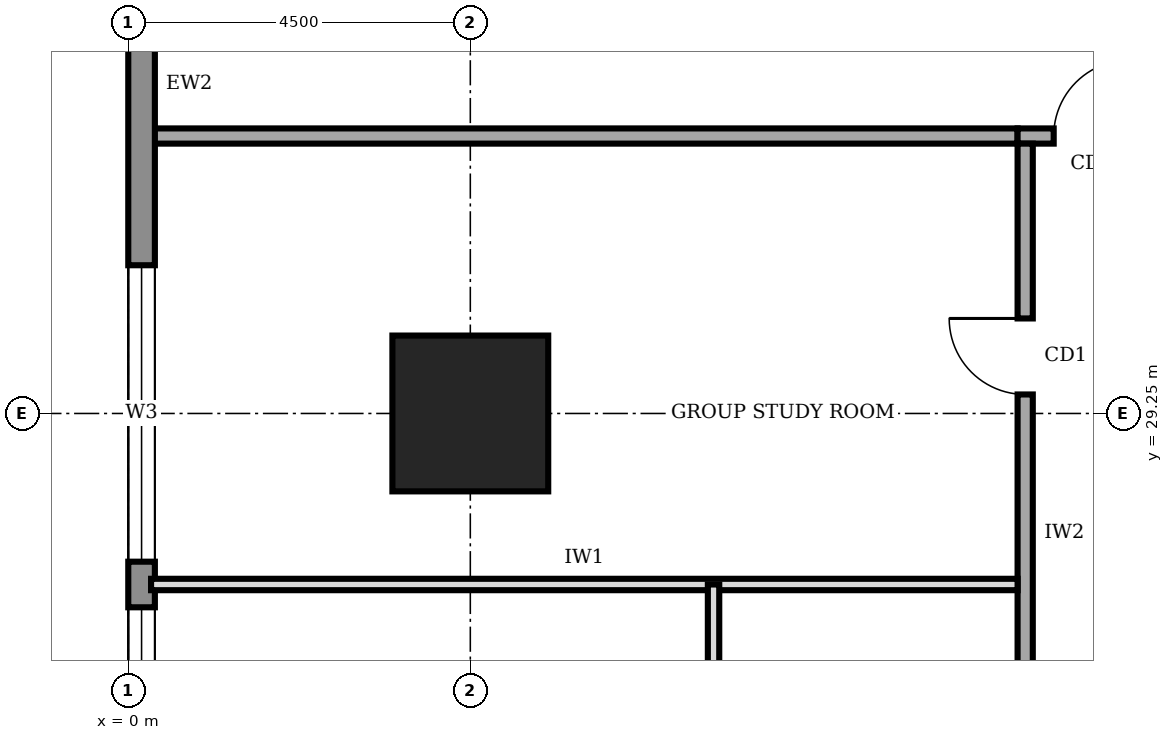
"""IFC4 building model, lengths in metres.
Left out: names, types, materials, properties, quantities, classifications, styles, units other than length and angle.
Written with IfcOpenShell. Run it as: python <this file> out.ifc"""

import sys

from ifc_helpers import new_model, si_unit, direction, frame, frame_2d, origin, origin_2d, place, context, subcontext, project, spatial, rectangle, extrude, element, fill, save


model = new_model("IFC4")
c1 = context("Model", 3, precision=1e-05, world=origin(), true_north=direction((0.0, 1.0)))
c2 = subcontext(c1, "Body", "Model", "MODEL_VIEW")
j1 = project(units=[si_unit("LENGTHUNIT", "METRE"), si_unit("PLANEANGLEUNIT", "RADIAN")], contexts=[c1])
p1 = place(None, origin())
s1 = spatial("IfcSite", under=j1, at=p1, CompositionType="ELEMENT")
p2 = place(p1, origin())
s2 = spatial("IfcBuilding", under=s1, at=p2, CompositionType="ELEMENT")
p3 = place(p2, frame((0.0, 0.0, 193.0)))
s3 = spatial("IfcBuildingStorey", under=s2, at=p3, CompositionType="ELEMENT", Elevation=193.0)
p4 = place(p3, frame((4.5, 29.25, 0.0), z_axis=(0.0, 0.0, 1.0), x_axis=(1.0, 0.0, 0.0)))
e1 = element("IfcColumn", 1, at=p4, inside=s3, PredefinedType="COLUMN", context=c2, shape_type="SweptSolid", body=[
    extrude(rectangle(XDim=2.05, YDim=2.05, at=origin_2d()), origin(), (0.0, 0.0, 1.0), 4.0),
])
p5 = place(p3, frame((0.175, 35.98, 0.0), z_axis=(0.0, 0.0, 1.0), x_axis=(0.0, -1.0, 0.0)))
e2 = element("IfcWall", 2, at=p5, inside=s3, PredefinedType="STANDARD", context=c2, shape_type="SweptSolid", body=[
    extrude(rectangle(XDim=31.46, YDim=0.35, at=frame_2d((15.73, 0.0))), origin(), (0.0, 0.0, 1.0), 3.75),
])
p6 = place(p5, frame((27.21, 0.0, 0.95)))
e3 = element("IfcOpeningElement", 3, at=p6, cuts=e2, PredefinedType="OPENING", context=c2, shape_type="SweptSolid", body=[
    extrude(rectangle(XDim=3.9, YDim=1.8, at=frame_2d((1.95, 0.9))), frame((0.0, 0.185, 0.0), z_axis=(0.0, -1.0, 0.0), x_axis=(1.0, 0.0, 0.0)), (0.0, 0.0, 1.0), 0.37),
])
p7 = place(p5, frame((22.78, 0.0, 0.95)))
e4 = element("IfcOpeningElement", 4, at=p7, cuts=e2, PredefinedType="OPENING", context=c2, shape_type="SweptSolid", body=[
    extrude(rectangle(XDim=3.9, YDim=1.8, at=frame_2d((1.95, 0.9))), frame((0.0, 0.185, 0.0), z_axis=(0.0, -1.0, 0.0), x_axis=(1.0, 0.0, 0.0)), (0.0, 0.0, 1.0), 0.37),
])
p8 = place(p5, frame((18.28, 0.0, 0.95)))
e5 = element("IfcOpeningElement", 5, at=p8, cuts=e2, PredefinedType="OPENING", context=c2, shape_type="SweptSolid", body=[
    extrude(rectangle(XDim=3.9, YDim=1.8, at=frame_2d((1.95, 0.9))), frame((0.0, 0.185, 0.0), z_axis=(0.0, -1.0, 0.0), x_axis=(1.0, 0.0, 0.0)), (0.0, 0.0, 1.0), 0.37),
])
p9 = place(p5, frame((13.78, 0.0, 0.95)))
e6 = element("IfcOpeningElement", 6, at=p9, cuts=e2, PredefinedType="OPENING", context=c2, shape_type="SweptSolid", body=[
    extrude(rectangle(XDim=3.9, YDim=1.8, at=frame_2d((1.95, 0.9))), frame((0.0, 0.185, 0.0), z_axis=(0.0, -1.0, 0.0), x_axis=(1.0, 0.0, 0.0)), (0.0, 0.0, 1.0), 0.37),
])
p10 = place(p5, frame((9.28, 0.0, 0.95)))
e7 = element("IfcOpeningElement", 7, at=p10, cuts=e2, PredefinedType="OPENING", context=c2, shape_type="SweptSolid", body=[
    extrude(rectangle(XDim=3.9, YDim=1.8, at=frame_2d((1.95, 0.9))), frame((0.0, 0.185, 0.0), z_axis=(0.0, -1.0, 0.0), x_axis=(1.0, 0.0, 0.0)), (0.0, 0.0, 1.0), 0.37),
])
p11 = place(p5, frame((4.78, 0.0, 0.95)))
e8 = element("IfcOpeningElement", 8, at=p11, cuts=e2, PredefinedType="OPENING", context=c2, shape_type="SweptSolid", body=[
    extrude(rectangle(XDim=3.9, YDim=1.8, at=frame_2d((1.95, 0.9))), frame((0.0, 0.185, 0.0), z_axis=(0.0, -1.0, 0.0), x_axis=(1.0, 0.0, 0.0)), (0.0, 0.0, 1.0), 0.37),
])
p12 = place(p3, frame((28.6, 32.9, 0.0), z_axis=(0.0, 0.0, 1.0), x_axis=(-1.0, 0.0, 0.0)))
e9 = element("IfcWall", 9, at=p12, inside=s3, PredefinedType="SOLIDWALL", context=c2, shape_type="SweptSolid", body=[
    extrude(rectangle(XDim=16.9, YDim=0.2, at=frame_2d((8.45, 0.0))), origin(), (0.0, 0.0, 1.0), 3.75),
])
p13 = place(p12, frame((15.425, 0.0, 0.0)))
e10 = element("IfcOpeningElement", 10, at=p13, cuts=e9, PredefinedType="OPENING", context=c2, shape_type="SweptSolid", body=[
    extrude(rectangle(XDim=1.0, YDim=2.1, at=frame_2d((0.5, 1.05))), frame((0.0, 0.11, 0.0), z_axis=(0.0, -1.0, 0.0), x_axis=(1.0, 0.0, 0.0)), (0.0, 0.0, 1.0), 0.22),
])
p14 = place(p12, frame((12.35, 0.0, 0.0)))
e11 = element("IfcOpeningElement", 11, at=p14, cuts=e9, PredefinedType="OPENING", context=c2, shape_type="SweptSolid", body=[
    extrude(rectangle(XDim=1.0, YDim=2.1, at=frame_2d((0.5, 1.05))), frame((0.0, 0.11, 0.0), z_axis=(0.0, -1.0, 0.0), x_axis=(1.0, 0.0, 0.0)), (0.0, 0.0, 1.0), 0.22),
])
p15 = place(p12, frame((5.6, 0.0, 0.0)))
e12 = element("IfcOpeningElement", 12, at=p15, cuts=e9, PredefinedType="OPENING", context=c2, shape_type="SweptSolid", body=[
    extrude(rectangle(XDim=1.0, YDim=2.1, at=frame_2d((0.5, 1.05))), frame((0.0, 0.11, 0.0), z_axis=(0.0, -1.0, 0.0), x_axis=(1.0, 0.0, 0.0)), (0.0, 0.0, 1.0), 0.22),
])
p16 = place(p12, frame((0.275, 0.0, 0.0)))
e13 = element("IfcOpeningElement", 13, at=p16, cuts=e9, PredefinedType="OPENING", context=c2, shape_type="SweptSolid", body=[
    extrude(rectangle(XDim=1.0, YDim=2.1, at=frame_2d((0.5, 1.05))), frame((0.0, 0.11, 0.0), z_axis=(0.0, -1.0, 0.0), x_axis=(1.0, 0.0, 0.0)), (0.0, 0.0, 1.0), 0.22),
])
p17 = place(p3, frame((11.8, 32.8, 0.0), z_axis=(0.0, 0.0, 1.0), x_axis=(0.0, -1.0, 0.0)))
e14 = element("IfcWall", 14, at=p17, inside=s3, PredefinedType="SOLIDWALL", context=c2, shape_type="SweptSolid", body=[
    extrude(rectangle(XDim=25.3, YDim=0.2, at=frame_2d((12.65, 0.0))), origin(), (0.0, 0.0, 1.0), 3.75),
])
p18 = place(p17, frame((21.8, 0.0, 0.0)))
e15 = element("IfcOpeningElement", 15, at=p18, cuts=e14, PredefinedType="OPENING", context=c2, shape_type="SweptSolid", body=[
    extrude(rectangle(XDim=1.0, YDim=2.1, at=frame_2d((0.5, 1.05))), frame((0.0, 0.11, 0.0), z_axis=(0.0, -1.0, 0.0), x_axis=(1.0, 0.0, 0.0)), (0.0, 0.0, 1.0), 0.22),
])
p19 = place(p17, frame((17.7, 0.0, 0.0)))
e16 = element("IfcOpeningElement", 16, at=p19, cuts=e14, PredefinedType="OPENING", context=c2, shape_type="SweptSolid", body=[
    extrude(rectangle(XDim=1.0, YDim=2.1, at=frame_2d((0.5, 1.05))), frame((0.0, 0.11, 0.0), z_axis=(0.0, -1.0, 0.0), x_axis=(1.0, 0.0, 0.0)), (0.0, 0.0, 1.0), 0.22),
])
p20 = place(p17, frame((14.7, 0.0, 0.0)))
e17 = element("IfcOpeningElement", 17, at=p20, cuts=e14, PredefinedType="OPENING", context=c2, shape_type="SweptSolid", body=[
    extrude(rectangle(XDim=0.9, YDim=2.1, at=frame_2d((0.45, 1.05))), frame((0.0, 0.11, 0.0), z_axis=(0.0, -1.0, 0.0), x_axis=(1.0, 0.0, 0.0)), (0.0, 0.0, 1.0), 0.22),
])
p21 = place(p17, frame((11.65, 0.0, 0.0)))
e18 = element("IfcOpeningElement", 18, at=p21, cuts=e14, PredefinedType="OPENING", context=c2, shape_type="SweptSolid", body=[
    extrude(rectangle(XDim=0.9, YDim=2.1, at=frame_2d((0.45, 1.05))), frame((0.0, 0.11, 0.0), z_axis=(0.0, -1.0, 0.0), x_axis=(1.0, 0.0, 0.0)), (0.0, 0.0, 1.0), 0.22),
])
p22 = place(p17, frame((6.95, 0.0, 0.0)))
e19 = element("IfcOpeningElement", 19, at=p22, cuts=e14, PredefinedType="OPENING", context=c2, shape_type="SweptSolid", body=[
    extrude(rectangle(XDim=0.9, YDim=2.1, at=frame_2d((0.45, 1.05))), frame((0.0, 0.11, 0.0), z_axis=(0.0, -1.0, 0.0), x_axis=(1.0, 0.0, 0.0)), (0.0, 0.0, 1.0), 0.22),
])
p23 = place(p17, frame((9.5, 0.0, 0.0)))
e20 = element("IfcOpeningElement", 20, at=p23, cuts=e14, PredefinedType="OPENING", context=c2, shape_type="SweptSolid", body=[
    extrude(rectangle(XDim=1.0, YDim=2.1, at=frame_2d((0.5, 1.05))), frame((0.0, 0.11, 0.0), z_axis=(0.0, -1.0, 0.0), x_axis=(1.0, 0.0, 0.0)), (0.0, 0.0, 1.0), 0.22),
])
p24 = place(p17, frame((2.3, 0.0, 0.0)))
e21 = element("IfcOpeningElement", 21, at=p24, cuts=e14, PredefinedType="OPENING", context=c2, shape_type="SweptSolid", body=[
    extrude(rectangle(XDim=1.0, YDim=2.1, at=frame_2d((0.5, 1.05))), frame((0.0, 0.11, 0.0), z_axis=(0.0, -1.0, 0.0), x_axis=(1.0, 0.0, 0.0)), (0.0, 0.0, 1.0), 0.22),
])
p25 = place(p3, frame((0.3, 32.9, 0.0), z_axis=(0.0, 0.0, 1.0), x_axis=(1.0, 0.0, 0.0)))
e22 = element("IfcWall", 22, at=p25, inside=s3, PredefinedType="SOLIDWALL", context=c2, shape_type="SweptSolid", body=[
    extrude(rectangle(XDim=11.4, YDim=0.2, at=frame_2d((5.7, 0.0))), origin(), (0.0, 0.0, 1.0), 3.75),
])
p26 = place(p3, frame((0.3, 27.0, 0.0), z_axis=(0.0, 0.0, 1.0), x_axis=(1.0, 0.0, 0.0)))
e23 = element("IfcWall", 23, at=p26, inside=s3, PredefinedType="PARTITIONING", context=c2, shape_type="SweptSolid", body=[
    extrude(rectangle(XDim=11.4, YDim=0.15, at=frame_2d((5.7, 0.0))), origin(), (0.0, 0.0, 1.0), 3.75),
])
p27 = place(p3, frame((7.7, 23.8, 0.0), z_axis=(0.0, 0.0, 1.0), x_axis=(0.0, 1.0, 0.0)))
e24 = element("IfcWall", 24, at=p27, inside=s3, PredefinedType="PARTITIONING", context=c2, shape_type="SweptSolid", body=[
    extrude(rectangle(XDim=3.2, YDim=0.15, at=frame_2d((1.6, 0.0))), origin(), (0.0, 0.0, 1.0), 3.75),
])
p28 = place(p10, origin())
e25 = element("IfcWindow", 25, at=p28, inside=s3, PartitioningType="SINGLE_PANEL", PredefinedType="WINDOW", context=c2, shape_type="SweptSolid", body=[
    extrude(rectangle(XDim=3.9, YDim=1.8, at=frame_2d((1.95, 0.9))), frame((0.0, 0.03, 0.0), z_axis=(0.0, -1.0, 0.0), x_axis=(1.0, 0.0, 0.0)), (0.0, 0.0, 1.0), 0.06),
])
fill(e7, e25)
p29 = place(p11, origin())
e26 = element("IfcWindow", 26, at=p29, inside=s3, PartitioningType="SINGLE_PANEL", PredefinedType="WINDOW", context=c2, shape_type="SweptSolid", body=[
    extrude(rectangle(XDim=3.9, YDim=1.8, at=frame_2d((1.95, 0.9))), frame((0.0, 0.03, 0.0), z_axis=(0.0, -1.0, 0.0), x_axis=(1.0, 0.0, 0.0)), (0.0, 0.0, 1.0), 0.06),
])
fill(e8, e26)
p30 = place(p13, frame((1.0, 0.0, 0.0), z_axis=(0.0, 0.0, 1.0), x_axis=(-1.0, 0.0, 0.0)))
e27 = element("IfcDoor", 27, at=p30, inside=s3, OperationType="SINGLE_SWING_RIGHT", PredefinedType="DOOR", context=c2, shape_type="SweptSolid", body=[
    extrude(rectangle(XDim=1.0, YDim=2.1, at=frame_2d((0.5, 1.05))), frame((0.0, 0.025, 0.0), z_axis=(0.0, -1.0, 0.0), x_axis=(1.0, 0.0, 0.0)), (0.0, 0.0, 1.0), 0.05),
])
fill(e10, e27)
p31 = place(p24, frame((1.0, 0.0, 0.0), z_axis=(0.0, 0.0, 1.0), x_axis=(-1.0, 0.0, 0.0)))
e28 = element("IfcDoor", 28, at=p31, inside=s3, OperationType="SINGLE_SWING_RIGHT", PredefinedType="DOOR", context=c2, shape_type="SweptSolid", body=[
    extrude(rectangle(XDim=1.0, YDim=2.1, at=frame_2d((0.5, 1.05))), frame((0.0, 0.025, 0.0), z_axis=(0.0, -1.0, 0.0), x_axis=(1.0, 0.0, 0.0)), (0.0, 0.0, 1.0), 0.05),
])
fill(e21, e28)
save(model, sys.argv[1])
